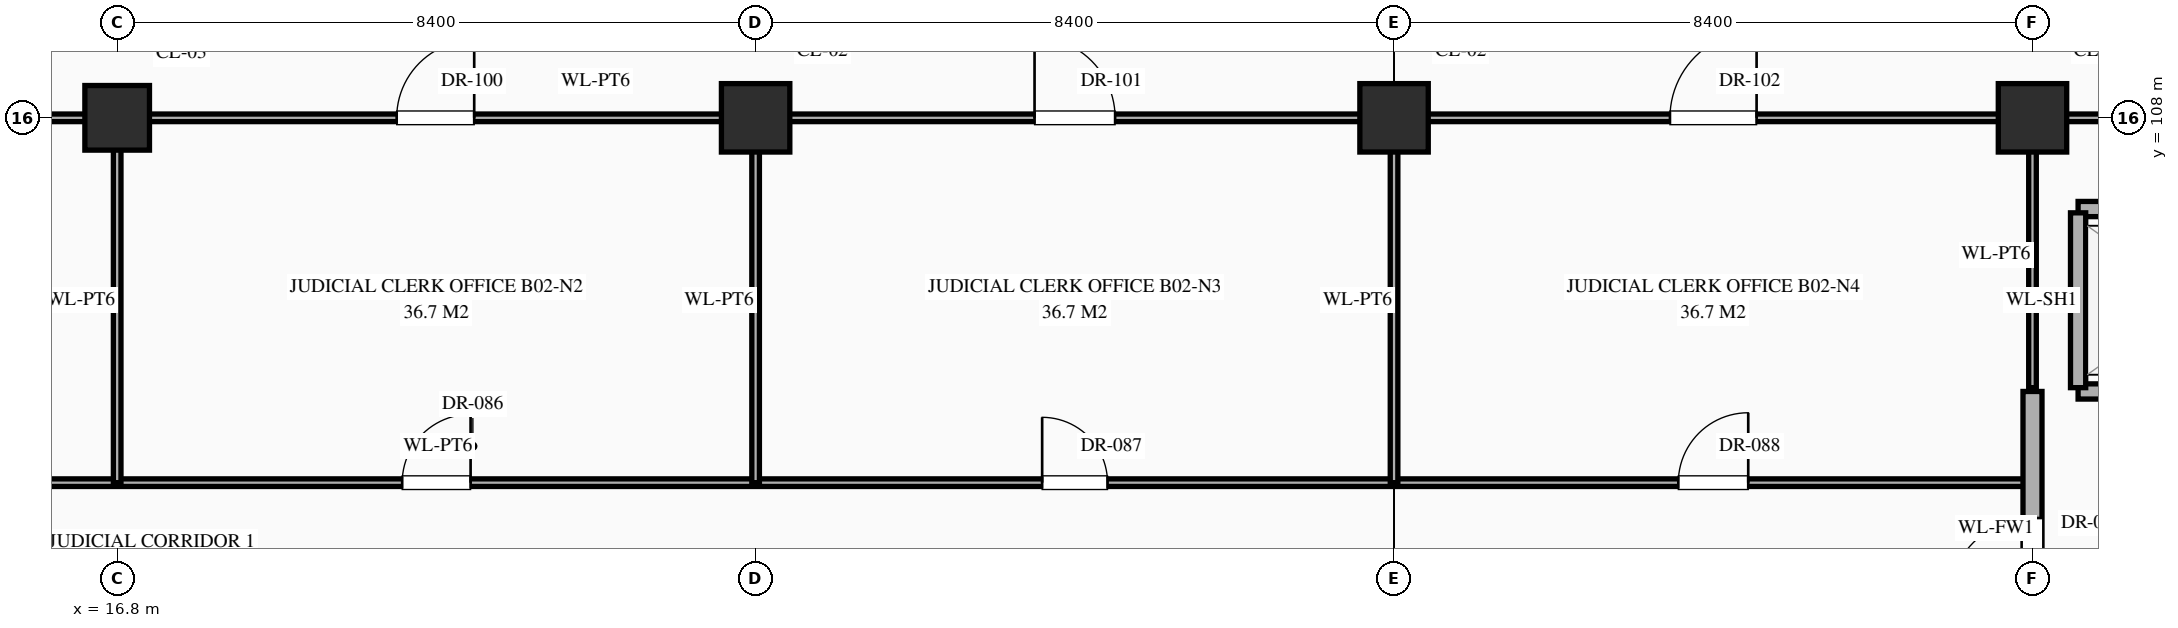
"""IFC4 building model, lengths in metres.
Left out: names, types, materials, properties, quantities, classifications, styles, units other than length and angle.
Written with IfcOpenShell. Run it as: python <this file> out.ifc"""

import sys

from ifc_helpers import new_model, si_unit, direction, frame, frame_2d, origin, origin_2d, place, context, subcontext, project, spatial, rectangle, extrude, element, fill, save


model = new_model("IFC4")
c1 = context("Model", 3, precision=1e-05, world=origin(), true_north=direction((0.0, 1.0)))
c2 = subcontext(c1, "Body", "Model", "MODEL_VIEW")
j1 = project(units=[si_unit("LENGTHUNIT", "METRE"), si_unit("PLANEANGLEUNIT", "RADIAN")], contexts=[c1])
p1 = place(None, origin())
s1 = spatial("IfcSite", under=j1, at=p1, CompositionType="ELEMENT")
p2 = place(p1, origin())
s2 = spatial("IfcBuilding", under=s1, at=p2, CompositionType="ELEMENT")
p3 = place(p2, frame((0.0, 0.0, -10.2)))
s3 = spatial("IfcBuildingStorey", under=s2, at=p3, CompositionType="ELEMENT", Elevation=-10.2)
p4 = place(p3, frame((16.8, 108.0, 0.0), z_axis=(0.0, 0.0, 1.0), x_axis=(1.0, 0.0, 0.0)))
e1 = element("IfcColumn", 1, at=p4, inside=s3, PredefinedType="COLUMN", context=c2, shape_type="SweptSolid", body=[
    extrude(rectangle(XDim=0.85, YDim=0.85, at=origin_2d()), origin(), (0.0, 0.0, 1.0), 4.8),
])
for number, where, z_axis, x_axis in (
    (2, (25.2, 108.0, 0.0), (0.0, 0.0, 1.0), (1.0, 0.0, 0.0)),
    (3, (33.6, 108.0, 0.0), (0.0, 0.0, 1.0), (1.0, 0.0, 0.0)),
    (4, (42.0, 108.0, 0.0), (0.0, 0.0, 1.0), (1.0, 0.0, 0.0)),
):
    element("IfcColumn", number, at=place(p3, frame(where, z_axis=z_axis, x_axis=x_axis)), inside=s3, PredefinedType="COLUMN", context=c2, shape_type="SweptSolid", body=[
        extrude(rectangle(XDim=0.9, YDim=0.9, at=origin_2d()), origin(), (0.0, 0.0, 1.0), 4.8),
    ])
p5 = place(p3, frame((0.04, 103.2, 0.0), z_axis=(0.0, 0.0, 1.0), x_axis=(1.0, 0.0, 0.0)))
e5 = element("IfcWall", 5, at=p5, inside=s3, PredefinedType="STANDARD", context=c2, shape_type="SweptSolid", body=[
    extrude(rectangle(XDim=41.96, YDim=0.1, at=frame_2d((20.98, 0.0))), origin(), (0.0, 0.0, 1.0), 4.48),
])
p6 = place(p5, frame((3.65, 0.0, 0.0)))
e6 = element("IfcOpeningElement", 6, at=p6, cuts=e5, PredefinedType="OPENING", context=c2, shape_type="SweptSolid", body=[
    extrude(rectangle(XDim=1.06, YDim=2.4, at=frame_2d((0.53, 1.2))), frame((0.0, 0.062, 0.0), z_axis=(0.0, -1.0, 0.0), x_axis=(1.0, 0.0, 0.0)), (0.0, 0.0, 1.0), 0.124),
])
p7 = place(p5, frame((11.99, 0.0, 0.0)))
e7 = element("IfcOpeningElement", 7, at=p7, cuts=e5, PredefinedType="OPENING", context=c2, shape_type="SweptSolid", body=[
    extrude(rectangle(XDim=1.14, YDim=2.4, at=frame_2d((0.57, 1.2))), frame((0.0, 0.062, 0.0), z_axis=(0.0, -1.0, 0.0), x_axis=(1.0, 0.0, 0.0)), (0.0, 0.0, 1.0), 0.124),
])
p8 = place(p5, frame((20.51, 0.0, 0.0)))
e8 = element("IfcOpeningElement", 8, at=p8, cuts=e5, PredefinedType="OPENING", context=c2, shape_type="SweptSolid", body=[
    extrude(rectangle(XDim=0.9, YDim=2.15, at=frame_2d((0.45, 1.075))), frame((0.0, 0.062, 0.0), z_axis=(0.0, -1.0, 0.0), x_axis=(1.0, 0.0, 0.0)), (0.0, 0.0, 1.0), 0.124),
])
p9 = place(p5, frame((28.93, 0.0, 0.0)))
e9 = element("IfcOpeningElement", 9, at=p9, cuts=e5, PredefinedType="OPENING", context=c2, shape_type="SweptSolid", body=[
    extrude(rectangle(XDim=0.86, YDim=2.1, at=frame_2d((0.43, 1.05))), frame((0.0, 0.062, 0.0), z_axis=(0.0, -1.0, 0.0), x_axis=(1.0, 0.0, 0.0)), (0.0, 0.0, 1.0), 0.124),
])
p10 = place(p5, frame((37.3, 0.0, 0.0)))
e10 = element("IfcOpeningElement", 10, at=p10, cuts=e5, PredefinedType="OPENING", context=c2, shape_type="SweptSolid", body=[
    extrude(rectangle(XDim=0.92, YDim=2.15, at=frame_2d((0.46, 1.075))), frame((0.0, 0.062, 0.0), z_axis=(0.0, -1.0, 0.0), x_axis=(1.0, 0.0, 0.0)), (0.0, 0.0, 1.0), 0.124),
])
p11 = place(p3, frame((42.6, 104.4, 0.0), z_axis=(0.0, 0.0, 1.0), x_axis=(1.0, 0.0, 0.0)))
e11 = element("IfcWall", 11, at=p11, inside=s3, PredefinedType="STANDARD", context=c2, shape_type="SweptSolid", body=[
    extrude(rectangle(XDim=3.0, YDim=0.2, at=frame_2d((1.5, 0.0))), origin(), (0.0, 0.0, 1.0), 4.48),
])
p12 = place(p11, frame((0.9, 0.0, 0.0)))
e12 = element("IfcOpeningElement", 12, at=p12, cuts=e11, PredefinedType="OPENING", context=c2, shape_type="SweptSolid", body=[
    extrude(rectangle(XDim=1.2, YDim=2.15, at=frame_2d((0.6, 1.075))), frame((0.0, 0.112, 0.0), z_axis=(0.0, -1.0, 0.0), x_axis=(1.0, 0.0, 0.0)), (0.0, 0.0, 1.0), 0.224),
])
p13 = place(p3, frame((42.6, 106.8, 0.0), z_axis=(0.0, 0.0, 1.0), x_axis=(1.0, 0.0, 0.0)))
e13 = element("IfcWall", 13, at=p13, inside=s3, PredefinedType="STANDARD", context=c2, shape_type="SweptSolid", body=[
    extrude(rectangle(XDim=3.0, YDim=0.2, at=frame_2d((1.5, 0.0))), origin(), (0.0, 0.0, 1.0), 4.48),
])
p14 = place(p3, frame((0.04, 108.0, 0.0), z_axis=(0.0, 0.0, 1.0), x_axis=(1.0, 0.0, 0.0)))
e14 = element("IfcWall", 14, at=p14, inside=s3, PredefinedType="STANDARD", context=c2, shape_type="SweptSolid", body=[
    extrude(rectangle(XDim=41.96, YDim=0.1, at=frame_2d((20.98, 0.0))), origin(), (0.0, 0.0, 1.0), 3.63),
])
p15 = place(p14, frame((3.69, 0.0, 0.0)))
e15 = element("IfcOpeningElement", 15, at=p15, cuts=e14, PredefinedType="OPENING", context=c2, shape_type="SweptSolid", body=[
    extrude(rectangle(XDim=0.94, YDim=2.3, at=frame_2d((0.47, 1.15))), frame((0.0, 0.062, 0.0), z_axis=(0.0, -1.0, 0.0), x_axis=(1.0, 0.0, 0.0)), (0.0, 0.0, 1.0), 0.124),
])
p16 = place(p14, frame((12.07, 0.0, 0.0)))
e16 = element("IfcOpeningElement", 16, at=p16, cuts=e14, PredefinedType="OPENING", context=c2, shape_type="SweptSolid", body=[
    extrude(rectangle(XDim=0.98, YDim=2.35, at=frame_2d((0.49, 1.175))), frame((0.0, 0.062, 0.0), z_axis=(0.0, -1.0, 0.0), x_axis=(1.0, 0.0, 0.0)), (0.0, 0.0, 1.0), 0.124),
])
p17 = place(p14, frame((20.438, 0.0, 0.0)))
e17 = element("IfcOpeningElement", 17, at=p17, cuts=e14, PredefinedType="OPENING", context=c2, shape_type="SweptSolid", body=[
    extrude(rectangle(XDim=1.02, YDim=2.4, at=frame_2d((0.51, 1.2))), frame((0.0, 0.062, 0.0), z_axis=(0.0, -1.0, 0.0), x_axis=(1.0, 0.0, 0.0)), (0.0, 0.0, 1.0), 0.124),
])
p18 = place(p14, frame((28.83, 0.0, 0.0)))
e18 = element("IfcOpeningElement", 18, at=p18, cuts=e14, PredefinedType="OPENING", context=c2, shape_type="SweptSolid", body=[
    extrude(rectangle(XDim=1.06, YDim=2.4, at=frame_2d((0.53, 1.2))), frame((0.0, 0.062, 0.0), z_axis=(0.0, -1.0, 0.0), x_axis=(1.0, 0.0, 0.0)), (0.0, 0.0, 1.0), 0.124),
])
p19 = place(p14, frame((37.19, 0.0, 0.0)))
e19 = element("IfcOpeningElement", 19, at=p19, cuts=e14, PredefinedType="OPENING", context=c2, shape_type="SweptSolid", body=[
    extrude(rectangle(XDim=1.14, YDim=2.4, at=frame_2d((0.57, 1.2))), frame((0.0, 0.062, 0.0), z_axis=(0.0, -1.0, 0.0), x_axis=(1.0, 0.0, 0.0)), (0.0, 0.0, 1.0), 0.124),
])
p20 = place(p3, frame((42.05, 108.0, 0.0), z_axis=(0.0, 0.0, 1.0), x_axis=(1.0, 0.0, 0.0)))
e20 = element("IfcWall", 20, at=p20, inside=s3, PredefinedType="STANDARD", context=c2, shape_type="SweptSolid", body=[
    extrude(rectangle(XDim=4.1, YDim=0.1, at=frame_2d((2.05, 0.0))), origin(), (0.0, 0.0, 1.0), 3.63),
])
for number, where, z_axis, x_axis in (
    (21, (16.8, 103.2, 0.0), (0.0, 0.0, 1.0), (0.0, 1.0, 0.0)),
    (22, (25.2, 103.2, 0.0), (0.0, 0.0, 1.0), (0.0, 1.0, 0.0)),
    (23, (33.6, 103.2, 0.0), (0.0, 0.0, 1.0), (0.0, 1.0, 0.0)),
):
    element("IfcWall", number, at=place(p3, frame(where, z_axis=z_axis, x_axis=x_axis)), inside=s3, PredefinedType="STANDARD", context=c2, shape_type="SweptSolid", body=[
        extrude(rectangle(XDim=4.8, YDim=0.1, at=frame_2d((2.4, 0.0))), origin(), (0.0, 0.0, 1.0), 3.73),
    ])
p21 = place(p3, frame((42.0, 100.8, 0.0), z_axis=(0.0, 0.0, 1.0), x_axis=(0.0, 1.0, 0.0)))
e24 = element("IfcWall", 24, at=p21, inside=s3, PredefinedType="STANDARD", context=c2, shape_type="SweptSolid", body=[
    extrude(rectangle(XDim=3.6, YDim=0.25, at=frame_2d((1.8, 0.0))), origin(), (0.0, 0.0, 1.0), 3.73),
])
p22 = place(p21, frame((0.835, 0.0, 0.0)))
e25 = element("IfcOpeningElement", 25, at=p22, cuts=e24, PredefinedType="OPENING", context=c2, shape_type="SweptSolid", body=[
    extrude(rectangle(XDim=1.1, YDim=2.2, at=frame_2d((0.55, 1.1))), frame((0.0, 0.137, 0.0), z_axis=(0.0, -1.0, 0.0), x_axis=(1.0, 0.0, 0.0)), (0.0, 0.0, 1.0), 0.274),
])
p23 = place(p3, frame((42.0, 104.45, 0.0), z_axis=(0.0, 0.0, 1.0), x_axis=(0.0, 1.0, 0.0)))
e26 = element("IfcWall", 26, at=p23, inside=s3, PredefinedType="STANDARD", context=c2, shape_type="SweptSolid", body=[
    extrude(rectangle(XDim=3.5, YDim=0.1, at=frame_2d((1.75, 0.0))), origin(), (0.0, 0.0, 1.0), 3.73),
])
p24 = place(p3, frame((42.6, 104.45, 0.0), z_axis=(0.0, 0.0, 1.0), x_axis=(0.0, 1.0, 0.0)))
e27 = element("IfcWall", 27, at=p24, inside=s3, PredefinedType="STANDARD", context=c2, shape_type="SweptSolid", body=[
    extrude(rectangle(XDim=2.3, YDim=0.2, at=frame_2d((1.15, 0.0))), origin(), (0.0, 0.0, 1.0), 4.48),
])
p25 = place(p22, origin())
e28 = element("IfcDoor", 28, at=p25, inside=s3, OperationType="SINGLE_SWING_LEFT", PredefinedType="DOOR", context=c2, shape_type="SweptSolid", body=[
    extrude(rectangle(XDim=1.1, YDim=2.2, at=frame_2d((0.55, 1.1))), frame((0.0, 0.025, 0.0), z_axis=(0.0, -1.0, 0.0), x_axis=(1.0, 0.0, 0.0)), (0.0, 0.0, 1.0), 0.05),
])
fill(e25, e28)
p26 = place(p8, origin())
e29 = element("IfcDoor", 29, at=p26, inside=s3, OperationType="SINGLE_SWING_RIGHT", PredefinedType="DOOR", context=c2, shape_type="SweptSolid", body=[
    extrude(rectangle(XDim=0.9, YDim=2.15, at=frame_2d((0.45, 1.075))), frame((0.0, 0.025, 0.0), z_axis=(0.0, -1.0, 0.0), x_axis=(1.0, 0.0, 0.0)), (0.0, 0.0, 1.0), 0.05),
])
fill(e8, e29)
p27 = place(p9, origin())
e30 = element("IfcDoor", 30, at=p27, inside=s3, OperationType="SINGLE_SWING_LEFT", PredefinedType="DOOR", context=c2, shape_type="SweptSolid", body=[
    extrude(rectangle(XDim=0.86, YDim=2.1, at=frame_2d((0.43, 1.05))), frame((0.0, 0.025, 0.0), z_axis=(0.0, -1.0, 0.0), x_axis=(1.0, 0.0, 0.0)), (0.0, 0.0, 1.0), 0.05),
])
fill(e9, e30)
p28 = place(p10, origin())
e31 = element("IfcDoor", 31, at=p28, inside=s3, OperationType="SINGLE_SWING_RIGHT", PredefinedType="DOOR", context=c2, shape_type="SweptSolid", body=[
    extrude(rectangle(XDim=0.92, YDim=2.15, at=frame_2d((0.46, 1.075))), frame((0.0, 0.025, 0.0), z_axis=(0.0, -1.0, 0.0), x_axis=(1.0, 0.0, 0.0)), (0.0, 0.0, 1.0), 0.05),
])
fill(e10, e31)
p29 = place(p17, origin())
e32 = element("IfcDoor", 32, at=p29, inside=s3, OperationType="SINGLE_SWING_RIGHT", PredefinedType="DOOR", context=c2, shape_type="SweptSolid", body=[
    extrude(rectangle(XDim=1.02, YDim=2.4, at=frame_2d((0.51, 1.2))), frame((0.0, 0.025, 0.0), z_axis=(0.0, -1.0, 0.0), x_axis=(1.0, 0.0, 0.0)), (0.0, 0.0, 1.0), 0.05),
])
fill(e17, e32)
p30 = place(p18, origin())
e33 = element("IfcDoor", 33, at=p30, inside=s3, OperationType="SINGLE_SWING_LEFT", PredefinedType="DOOR", context=c2, shape_type="SweptSolid", body=[
    extrude(rectangle(XDim=1.06, YDim=2.4, at=frame_2d((0.53, 1.2))), frame((0.0, 0.025, 0.0), z_axis=(0.0, -1.0, 0.0), x_axis=(1.0, 0.0, 0.0)), (0.0, 0.0, 1.0), 0.05),
])
fill(e18, e33)
p31 = place(p19, origin())
e34 = element("IfcDoor", 34, at=p31, inside=s3, OperationType="SINGLE_SWING_RIGHT", PredefinedType="DOOR", context=c2, shape_type="SweptSolid", body=[
    extrude(rectangle(XDim=1.14, YDim=2.4, at=frame_2d((0.57, 1.2))), frame((0.0, 0.025, 0.0), z_axis=(0.0, -1.0, 0.0), x_axis=(1.0, 0.0, 0.0)), (0.0, 0.0, 1.0), 0.05),
])
fill(e19, e34)
save(model, sys.argv[1])
